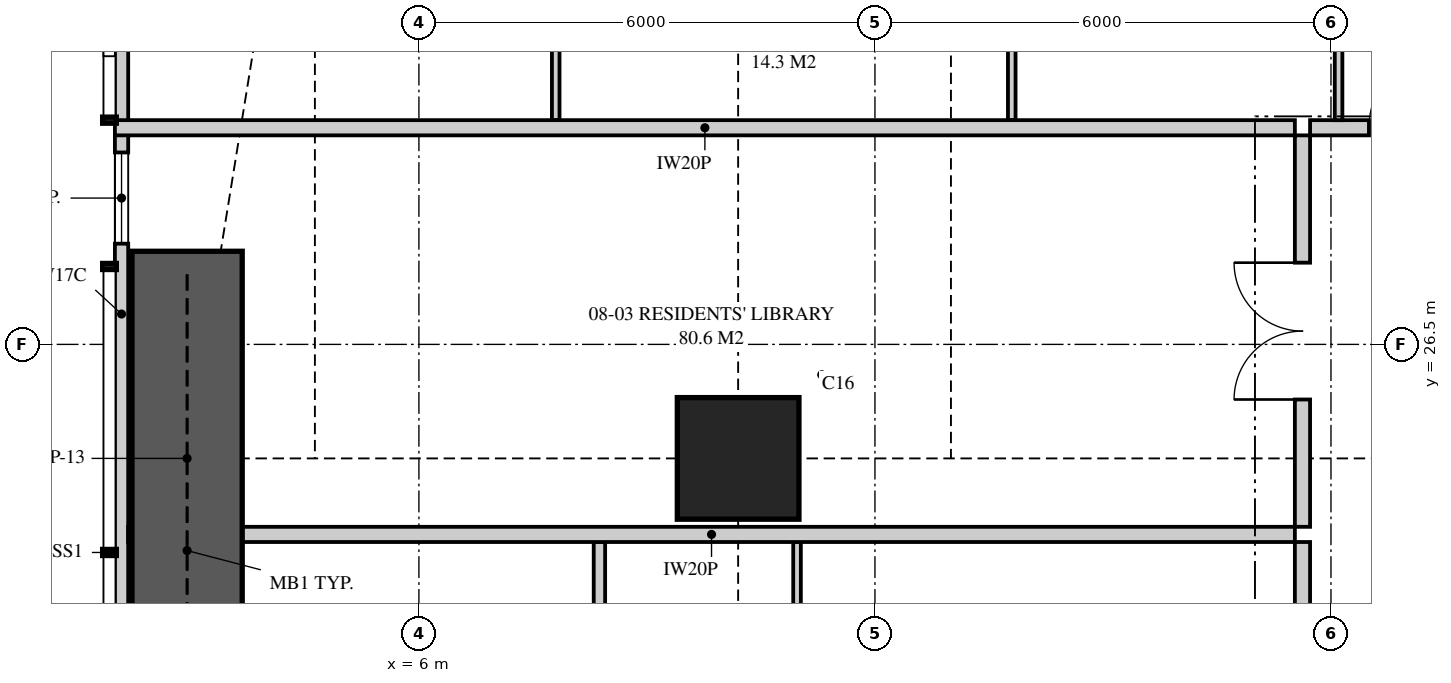
"""IFC4 building model, lengths in metres.
Left out: names, types, materials, properties, quantities, classifications, styles, units other than length and angle.
Written with IfcOpenShell. Run it as: python <this file> out.ifc"""

import sys

from ifc_helpers import new_model, si_unit, direction, frame, frame_2d, origin, origin_2d, place, context, subcontext, project, spatial, polyline, rectangle, outline, extrude, element, fill, save


model = new_model("IFC4")
c1 = context("Model", 3, precision=1e-05, world=origin(), true_north=direction((0.0, 1.0)))
c2 = subcontext(c1, "Body", "Model", "MODEL_VIEW")
j1 = project(units=[si_unit("LENGTHUNIT", "METRE"), si_unit("PLANEANGLEUNIT", "RADIAN")], contexts=[c1])
p1 = place(None, origin())
s1 = spatial("IfcSite", under=j1, at=p1, CompositionType="ELEMENT")
p2 = place(p1, origin())
s2 = spatial("IfcBuilding", under=s1, at=p2, CompositionType="ELEMENT")
p3 = place(p2, frame((0.0, 0.0, 34.4)))
s3 = spatial("IfcBuildingStorey", under=s2, at=p3, CompositionType="ELEMENT", Elevation=34.4)
p4 = place(p3, frame((10.2, 25.0, 0.0), z_axis=(0.0, 0.0, 1.0), x_axis=(1.0, 0.0, 0.0)))
e1 = element("IfcColumn", 1, at=p4, inside=s3, PredefinedType="COLUMN", context=c2, shape_type="SweptSolid", body=[
    extrude(rectangle(XDim=1.6, YDim=1.6, at=origin_2d()), origin(), (0.0, 0.0, 1.0), 3.35),
])
p5 = place(p3, frame((2.087, 34.949, 0.0), z_axis=(0.0, 0.0, 1.0), x_axis=(0.0, -1.0, 0.0)))
e2 = element("IfcWall", 2, at=p5, inside=s3, PredefinedType="SOLIDWALL", context=c2, shape_type="SweptSolid", body=[
    extrude(outline(polyline([(0.0, 0.0), (16.099, 0.0), (16.099, 2.15), (9.949, 2.15), (9.949, 3.11), (9.823, 3.11), (9.823, 2.15), (9.73, 2.15), (9.73, 3.11), (0.0, 3.11), (0.0, 0.0)])), frame((0.0, 0.087, 0.0), z_axis=(0.0, -1.0, 0.0), x_axis=(1.0, 0.0, 0.0)), (0.0, 0.0, 1.0), 0.175),
])
p6 = place(p5, frame((2.757, 0.0, 0.4)))
e3 = element("IfcOpeningElement", 3, at=p6, cuts=e2, PredefinedType="OPENING", context=c2, shape_type="SweptSolid", body=[
    extrude(rectangle(XDim=1.8, YDim=1.7, at=frame_2d((0.9, 0.85))), frame((0.0, 0.097, 0.0), z_axis=(0.0, -1.0, 0.0), x_axis=(1.0, 0.0, 0.0)), (0.0, 0.0, 1.0), 0.195),
])
p7 = place(p5, frame((5.924, 0.0, 0.4)))
e4 = element("IfcOpeningElement", 4, at=p7, cuts=e2, PredefinedType="OPENING", context=c2, shape_type="SweptSolid", body=[
    extrude(rectangle(XDim=1.2, YDim=1.7, at=frame_2d((0.6, 0.85))), frame((0.0, 0.097, 0.0), z_axis=(0.0, -1.0, 0.0), x_axis=(1.0, 0.0, 0.0)), (0.0, 0.0, 1.0), 0.195),
])
p8 = place(p5, frame((12.799, 0.0, 0.4)))
e5 = element("IfcOpeningElement", 5, at=p8, cuts=e2, PredefinedType="OPENING", context=c2, shape_type="SweptSolid", body=[
    extrude(rectangle(XDim=1.8, YDim=1.7, at=frame_2d((0.9, 0.85))), frame((0.0, 0.097, 0.0), z_axis=(0.0, -1.0, 0.0), x_axis=(1.0, 0.0, 0.0)), (0.0, 0.0, 1.0), 0.195),
])
p9 = place(p3, frame((17.725, 29.35, 0.0), z_axis=(0.0, 0.0, 1.0), x_axis=(1.0, 0.0, 0.0)))
e6 = element("IfcWall", 6, at=p9, inside=s3, PredefinedType="PARTITIONING", context=c2, shape_type="SweptSolid", body=[
    extrude(rectangle(XDim=5.375, YDim=0.2, at=frame_2d((2.688, 0.0))), origin(), (0.0, 0.0, 1.0), 3.11),
])
p10 = place(p9, frame((0.775, 0.0, 0.0)))
e7 = element("IfcOpeningElement", 7, at=p10, cuts=e6, PredefinedType="OPENING", context=c2, shape_type="SweptSolid", body=[
    extrude(rectangle(XDim=1.05, YDim=2.2, at=frame_2d((0.525, 1.1))), frame((0.0, 0.11, 0.0), z_axis=(0.0, -1.0, 0.0), x_axis=(1.0, 0.0, 0.0)), (0.0, 0.0, 1.0), 0.22),
])
p11 = place(p3, frame((7.8, 37.825, 0.0), z_axis=(0.0, 0.0, 1.0), x_axis=(0.0, -1.0, 0.0)))
e8 = element("IfcWall", 8, at=p11, inside=s3, PredefinedType="PARTITIONING", context=c2, shape_type="SweptSolid", body=[
    extrude(outline(polyline([(0.0, 0.0), (8.375, 0.0), (8.375, 3.11), (2.697, 3.11), (2.697, 2.15), (0.943, 2.15), (0.943, 3.11), (0.0, 3.11), (0.0, 0.0)])), frame((0.0, 0.05, 0.0), z_axis=(0.0, -1.0, 0.0), x_axis=(1.0, 0.0, 0.0)), (0.0, 0.0, 1.0), 0.1),
])
p12 = place(p11, frame((2.842, 0.0, 0.0)))
e9 = element("IfcOpeningElement", 9, at=p12, cuts=e8, PredefinedType="OPENING", context=c2, shape_type="SweptSolid", body=[
    extrude(rectangle(XDim=0.9, YDim=2.1, at=frame_2d((0.45, 1.05))), frame((0.0, 0.06, 0.0), z_axis=(0.0, -1.0, 0.0), x_axis=(1.0, 0.0, 0.0)), (0.0, 0.0, 1.0), 0.12),
])
p13 = place(p11, frame((6.059, 0.0, 0.0)))
e10 = element("IfcOpeningElement", 10, at=p13, cuts=e8, PredefinedType="OPENING", context=c2, shape_type="SweptSolid", body=[
    extrude(rectangle(XDim=0.9, YDim=2.1, at=frame_2d((0.45, 1.05))), frame((0.0, 0.06, 0.0), z_axis=(0.0, -1.0, 0.0), x_axis=(1.0, 0.0, 0.0)), (0.0, 0.0, 1.0), 0.12),
])
p14 = place(p3, frame((13.8, 37.825, 0.0), z_axis=(0.0, 0.0, 1.0), x_axis=(0.0, -1.0, 0.0)))
e11 = element("IfcWall", 11, at=p14, inside=s3, PredefinedType="PARTITIONING", context=c2, shape_type="SweptSolid", body=[
    extrude(outline(polyline([(1.635, 2.15), (0.0, 2.15), (0.0, 0.0), (8.375, 0.0), (8.375, 3.11), (1.635, 3.11), (1.635, 2.15)]), holes=[polyline([(1.021, 0.126), (0.529, 0.126), (0.529, 0.919), (1.021, 0.919), (1.021, 0.126)]), polyline([(1.021, 1.231), (0.529, 1.231), (0.529, 2.024), (1.021, 2.024), (1.021, 1.231)])]), frame((0.0, 0.05, 0.0), z_axis=(0.0, -1.0, 0.0), x_axis=(1.0, 0.0, 0.0)), (0.0, 0.0, 1.0), 0.1),
])
p15 = place(p14, frame((4.525, 0.0, 0.0)))
e12 = element("IfcOpeningElement", 12, at=p15, cuts=e11, PredefinedType="OPENING", context=c2, shape_type="SweptSolid", body=[
    extrude(rectangle(XDim=0.9, YDim=2.1, at=frame_2d((0.45, 1.05))), frame((0.0, 0.06, 0.0), z_axis=(0.0, -1.0, 0.0), x_axis=(1.0, 0.0, 0.0)), (0.0, 0.0, 1.0), 0.12),
])
p16 = place(p3, frame((18.1, 37.825, 0.0), z_axis=(0.0, 0.0, 1.0), x_axis=(0.0, -1.0, 0.0)))
e13 = element("IfcWall", 13, at=p16, inside=s3, PredefinedType="PARTITIONING", context=c2, shape_type="SweptSolid", body=[
    extrude(outline(polyline([(0.0, 0.0), (8.375, 0.0), (8.375, 3.11), (1.635, 3.11), (1.635, 2.15), (0.0, 2.15), (0.0, 3.11), (0.0, 0.0)])), frame((0.0, 0.05, 0.0), z_axis=(0.0, -1.0, 0.0), x_axis=(1.0, 0.0, 0.0)), (0.0, 0.0, 1.0), 0.1),
])
p17 = place(p16, frame((4.525, 0.0, 0.0)))
e14 = element("IfcOpeningElement", 14, at=p17, cuts=e13, PredefinedType="OPENING", context=c2, shape_type="SweptSolid", body=[
    extrude(rectangle(XDim=0.9, YDim=2.1, at=frame_2d((0.45, 1.05))), frame((0.0, 0.06, 0.0), z_axis=(0.0, -1.0, 0.0), x_axis=(1.0, 0.0, 0.0)), (0.0, 0.0, 1.0), 0.12),
])
p18 = place(p16, frame((5.95, 0.0, 0.0)))
e15 = element("IfcOpeningElement", 15, at=p18, cuts=e13, PredefinedType="OPENING", context=c2, shape_type="SweptSolid", body=[
    extrude(rectangle(XDim=0.9, YDim=2.1, at=frame_2d((0.45, 1.05))), frame((0.0, 0.06, 0.0), z_axis=(0.0, -1.0, 0.0), x_axis=(1.0, 0.0, 0.0)), (0.0, 0.0, 1.0), 0.12),
])
p19 = place(p3, frame((2.0, 29.35, 0.0), z_axis=(0.0, 0.0, 1.0), x_axis=(1.0, 0.0, 0.0)))
e16 = element("IfcWall", 16, at=p19, inside=s3, PredefinedType="PARTITIONING", context=c2, shape_type="SweptSolid", body=[
    extrude(outline(polyline([(0.0, 0.0), (15.525, 0.0), (15.525, 3.11), (11.337, 3.11), (11.337, 2.541), (10.663, 2.541), (10.663, 3.11), (9.51, 3.11), (9.51, 2.51), (6.89, 2.51), (6.89, 3.11), (2.969, 3.11), (2.969, 2.541), (2.577, 2.541), (2.577, 2.15), (0.733, 2.15), (0.733, 3.11), (0.0, 3.11), (0.0, 0.0)])), frame((0.0, 0.1, 0.0), z_axis=(0.0, -1.0, 0.0), x_axis=(1.0, 0.0, 0.0)), (0.0, 0.0, 1.0), 0.2),
])
p20 = place(p3, frame((2.175, 24.0, 0.0), z_axis=(0.0, 0.0, 1.0), x_axis=(1.0, 0.0, 0.0)))
e17 = element("IfcWall", 17, at=p20, inside=s3, PredefinedType="PARTITIONING", context=c2, shape_type="SweptSolid", body=[
    extrude(outline(polyline([(0.529, 2.15), (0.0, 2.15), (0.0, 0.0), (0.529, 0.0), (0.529, 0.815), (1.021, 0.815), (1.021, 0.0), (15.35, 0.0), (15.35, 3.11), (9.335, 3.11), (9.335, 2.51), (6.715, 2.51), (6.715, 3.11), (1.685, 3.11), (1.685, 2.15), (1.021, 2.15), (1.021, 1.335), (0.529, 1.335), (0.529, 2.15)])), frame((0.0, 0.1, 0.0), z_axis=(0.0, -1.0, 0.0), x_axis=(1.0, 0.0, 0.0)), (0.0, 0.0, 1.0), 0.2),
])
p21 = place(p3, frame((17.625, 14.1, 0.0), z_axis=(0.0, 0.0, 1.0), x_axis=(0.0, 1.0, 0.0)))
e18 = element("IfcWall", 18, at=p21, inside=s3, PredefinedType="PARTITIONING", context=c2, shape_type="SweptSolid", body=[
    extrude(rectangle(XDim=9.8, YDim=0.2, at=frame_2d((4.9, 0.0))), origin(), (0.0, 0.0, 1.0), 3.11),
])
p22 = place(p21, frame((4.4, 0.0, 0.0)))
e19 = element("IfcOpeningElement", 19, at=p22, cuts=e18, PredefinedType="OPENING", context=c2, shape_type="SweptSolid", body=[
    extrude(rectangle(XDim=1.05, YDim=2.2, at=frame_2d((0.525, 1.1))), frame((0.0, 0.11, 0.0), z_axis=(0.0, -1.0, 0.0), x_axis=(1.0, 0.0, 0.0)), (0.0, 0.0, 1.0), 0.22),
])
p23 = place(p3, frame((8.375, 20.0, 0.0), z_axis=(0.0, 0.0, 1.0), x_axis=(0.0, 1.0, 0.0)))
e20 = element("IfcWall", 20, at=p23, inside=s3, PredefinedType="PLUMBINGWALL", context=c2, shape_type="SweptSolid", body=[
    extrude(rectangle(XDim=3.9, YDim=0.15, at=frame_2d((1.95, 0.0))), origin(), (0.0, 0.0, 1.0), 3.11),
])
p24 = place(p23, frame((0.4, 0.0, 0.0)))
e21 = element("IfcOpeningElement", 21, at=p24, cuts=e20, PredefinedType="OPENING", context=c2, shape_type="SweptSolid", body=[
    extrude(rectangle(XDim=0.9, YDim=2.1, at=frame_2d((0.45, 1.05))), frame((0.0, 0.085, 0.0), z_axis=(0.0, -1.0, 0.0), x_axis=(1.0, 0.0, 0.0)), (0.0, 0.0, 1.0), 0.17),
])
p25 = place(p3, frame((10.975, 20.0, 0.0), z_axis=(0.0, 0.0, 1.0), x_axis=(0.0, 1.0, 0.0)))
e22 = element("IfcWall", 22, at=p25, inside=s3, PredefinedType="PARTITIONING", context=c2, shape_type="SweptSolid", body=[
    extrude(outline(polyline([(0.0, 0.0), (3.9, 0.0), (3.9, 3.11), (3.9, 2.51), (0.0, 2.51), (0.0, 3.11), (0.0, 0.0)])), frame((0.0, 0.05, 0.0), z_axis=(0.0, -1.0, 0.0), x_axis=(1.0, 0.0, 0.0)), (0.0, 0.0, 1.0), 0.1),
])
p26 = place(p3, frame((17.625, 24.1, 0.0), z_axis=(0.0, 0.0, 1.0), x_axis=(0.0, 1.0, 0.0)))
e23 = element("IfcWall", 23, at=p26, inside=s3, PredefinedType="PARTITIONING", context=c2, shape_type="SweptSolid", body=[
    extrude(outline(polyline([(0.0, 0.0), (5.15, 0.0), (5.15, 3.11), (1.237, 3.11), (1.237, 2.541), (0.562, 2.541), (0.562, 3.11), (0.0, 3.11), (0.0, 0.0)])), frame((0.0, 0.1, 0.0), z_axis=(0.0, -1.0, 0.0), x_axis=(1.0, 0.0, 0.0)), (0.0, 0.0, 1.0), 0.2),
])
p27 = place(p26, frame((1.675, 0.0, 0.0)))
e24 = element("IfcOpeningElement", 24, at=p27, cuts=e23, PredefinedType="OPENING", context=c2, shape_type="SweptSolid", body=[
    extrude(rectangle(XDim=1.8, YDim=2.1, at=frame_2d((0.9, 1.05))), frame((0.0, 0.11, 0.0), z_axis=(0.0, -1.0, 0.0), x_axis=(1.0, 0.0, 0.0)), (0.0, 0.0, 1.0), 0.22),
])
p28 = place(p3, frame((2.95, 22.275, 0.0), z_axis=(0.0, 0.0, 1.0), x_axis=(0.0, 1.0, 0.0)))
e25 = element("IfcWall", 25, at=p28, inside=s3, PredefinedType="SHEAR", context=c2, shape_type="SweptSolid", body=[
    extrude(rectangle(XDim=5.45, YDim=1.45, at=frame_2d((2.725, 0.0))), origin(), (0.0, 0.0, 1.0), 3.35),
])
p29 = place(p7, origin())
e26 = element("IfcWindow", 26, at=p29, inside=s3, PartitioningType="SINGLE_PANEL", PredefinedType="WINDOW", context=c2, shape_type="SweptSolid", body=[
    extrude(rectangle(XDim=1.2, YDim=1.7, at=frame_2d((0.6, 0.85))), frame((0.0, 0.03, 0.0), z_axis=(0.0, -1.0, 0.0), x_axis=(1.0, 0.0, 0.0)), (0.0, 0.0, 1.0), 0.06),
])
fill(e4, e26)
p30 = place(p10, origin())
e27 = element("IfcDoor", 27, at=p30, inside=s3, OperationType="SINGLE_SWING_RIGHT", PredefinedType="DOOR", context=c2, shape_type="SweptSolid", body=[
    extrude(rectangle(XDim=1.05, YDim=2.2, at=frame_2d((0.525, 1.1))), frame((0.0, 0.025, 0.0), z_axis=(0.0, -1.0, 0.0), x_axis=(1.0, 0.0, 0.0)), (0.0, 0.0, 1.0), 0.05),
])
fill(e7, e27)
p31 = place(p27, origin())
e28 = element("IfcDoor", 28, at=p31, inside=s3, OperationType="DOUBLE_DOOR_SINGLE_SWING", PredefinedType="DOOR", context=c2, shape_type="SweptSolid", body=[
    extrude(rectangle(XDim=1.8, YDim=2.1, at=frame_2d((0.9, 1.05))), frame((0.0, 0.025, 0.0), z_axis=(0.0, -1.0, 0.0), x_axis=(1.0, 0.0, 0.0)), (0.0, 0.0, 1.0), 0.05),
])
fill(e24, e28)
save(model, sys.argv[1])
